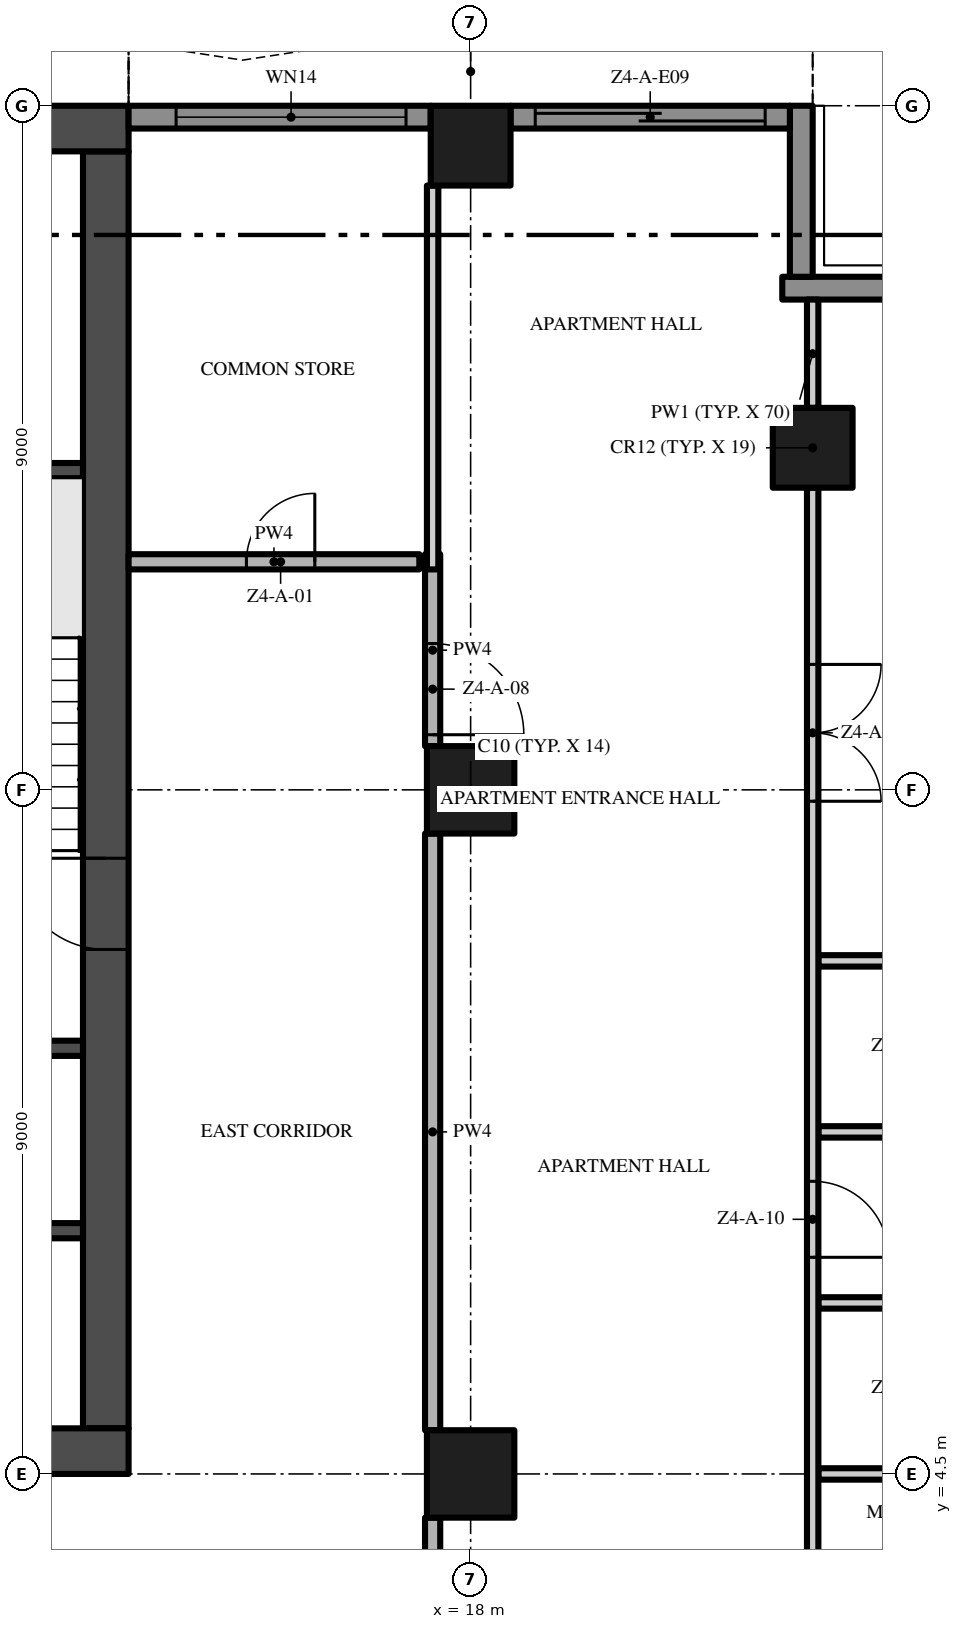
"""IFC4 building model, lengths in metres.
Left out: names, types, materials, properties, quantities, classifications, styles, units other than length and angle.
Written with IfcOpenShell. Run it as: python <this file> out.ifc"""

import sys

from ifc_helpers import new_model, si_unit, direction, frame, frame_2d, origin, origin_2d, place, context, subcontext, project, spatial, polyline, rectangle, outline, extrude, element, fill, save


model = new_model("IFC4")
c1 = context("Model", 3, precision=1e-05, world=origin(), true_north=direction((0.0, 1.0)))
c2 = subcontext(c1, "Body", "Model", "MODEL_VIEW")
j1 = project(units=[si_unit("LENGTHUNIT", "METRE"), si_unit("PLANEANGLEUNIT", "RADIAN")], contexts=[c1])
p1 = place(None, origin())
s1 = spatial("IfcSite", under=j1, at=p1, CompositionType="ELEMENT")
p2 = place(p1, origin())
s2 = spatial("IfcBuilding", under=s1, at=p2, CompositionType="ELEMENT")
p3 = place(p2, frame((0.0, 0.0, 188.2)))
s3 = spatial("IfcBuildingStorey", under=s2, at=p3, CompositionType="ELEMENT", Elevation=188.2)
p4 = place(p3, frame((-13.5, 4.8, -0.3), z_axis=(0.0, 0.0, 1.0), x_axis=(1.0, 0.0, 0.0)))
e1 = element("IfcWall", 1, at=p4, inside=s3, PredefinedType="SHEAR", context=c2, shape_type="SweptSolid", body=[
    extrude(rectangle(XDim=27.0, YDim=0.6, at=frame_2d((13.5, 0.0))), origin(), (0.0, 0.0, 1.0), 3.8),
])
p5 = place(p4, frame((12.0, 0.0, 0.3)))
e2 = element("IfcOpeningElement", 2, at=p5, cuts=e1, PredefinedType="OPENING", context=c2, shape_type="SweptSolid", body=[
    extrude(rectangle(XDim=3.0, YDim=2.4, at=frame_2d((1.5, 1.2))), frame((0.0, 0.31, 0.0), z_axis=(0.0, -1.0, 0.0), x_axis=(1.0, 0.0, 0.0)), (0.0, 0.0, 1.0), 0.62),
])
p6 = place(p4, frame((4.9, 0.0, 0.3)))
e3 = element("IfcOpeningElement", 3, at=p6, cuts=e1, PredefinedType="OPENING", context=c2, shape_type="SweptSolid", body=[
    extrude(rectangle(XDim=1.2, YDim=2.2, at=frame_2d((0.6, 1.1))), frame((0.0, 0.31, 0.0), z_axis=(0.0, -1.0, 0.0), x_axis=(1.0, 0.0, 0.0)), (0.0, 0.0, 1.0), 0.62),
])
p7 = place(p4, frame((20.75, 0.0, 0.3)))
e4 = element("IfcOpeningElement", 4, at=p7, cuts=e1, PredefinedType="OPENING", context=c2, shape_type="SweptSolid", body=[
    extrude(rectangle(XDim=1.5, YDim=2.2, at=frame_2d((0.75, 1.1))), frame((0.0, 0.31, 0.0), z_axis=(0.0, -1.0, 0.0), x_axis=(1.0, 0.0, 0.0)), (0.0, 0.0, 1.0), 0.62),
])
p8 = place(p4, frame((17.4, 0.0, 0.3)))
e5 = element("IfcOpeningElement", 5, at=p8, cuts=e1, PredefinedType="OPENING", context=c2, shape_type="SweptSolid", body=[
    extrude(rectangle(XDim=1.2, YDim=2.2, at=frame_2d((0.6, 1.1))), frame((0.0, 0.31, 0.0), z_axis=(0.0, -1.0, 0.0), x_axis=(1.0, 0.0, 0.0)), (0.0, 0.0, 1.0), 0.62),
])
p9 = place(p3, frame((13.2, 5.1, -0.3), z_axis=(0.0, 0.0, 1.0), x_axis=(0.0, 1.0, 0.0)))
e6 = element("IfcWall", 6, at=p9, inside=s3, PredefinedType="SHEAR", context=c2, shape_type="SweptSolid", body=[
    extrude(rectangle(XDim=16.8, YDim=0.6, at=frame_2d((8.4, 0.0))), origin(), (0.0, 0.0, 1.0), 3.8),
])
p10 = place(p9, frame((6.3, 0.0, 0.3)))
e7 = element("IfcOpeningElement", 7, at=p10, cuts=e6, PredefinedType="OPENING", context=c2, shape_type="SweptSolid", body=[
    extrude(rectangle(XDim=1.2, YDim=2.2, at=frame_2d((0.6, 1.1))), frame((0.0, 0.31, 0.0), z_axis=(0.0, -1.0, 0.0), x_axis=(1.0, 0.0, 0.0)), (0.0, 0.0, 1.0), 0.62),
])
p11 = place(p3, frame((13.5, 22.2, -0.3), z_axis=(0.0, 0.0, 1.0), x_axis=(-1.0, 0.0, 0.0)))
e8 = element("IfcWall", 8, at=p11, inside=s3, PredefinedType="SHEAR", context=c2, shape_type="SweptSolid", body=[
    extrude(rectangle(XDim=27.0, YDim=0.6, at=frame_2d((13.5, 0.0))), origin(), (0.0, 0.0, 1.0), 3.8),
])
p12 = place(p3, frame((18.0, 13.5, 0.0), z_axis=(0.0, 0.0, 1.0), x_axis=(1.0, 0.0, 0.0)))
e9 = element("IfcColumn", 9, at=p12, inside=s3, PredefinedType="COLUMN", context=c2, shape_type="SweptSolid", body=[
    extrude(rectangle(XDim=1.15, YDim=1.15, at=origin_2d()), origin(), (0.0, 0.0, 1.0), 3.5),
])
p13 = place(p3, frame((18.0, 21.975, 0.0), z_axis=(0.0, 0.0, 1.0), x_axis=(1.0, 0.0, 0.0)))
e10 = element("IfcColumn", 10, at=p13, inside=s3, PredefinedType="COLUMN", context=c2, shape_type="SweptSolid", body=[
    extrude(rectangle(XDim=1.05, YDim=1.05, at=origin_2d()), origin(), (0.0, 0.0, 1.0), 3.5),
])
p14 = place(p3, frame((18.0, 4.5, 0.0), z_axis=(0.0, 0.0, 1.0), x_axis=(1.0, 0.0, 0.0)))
e11 = element("IfcColumn", 11, at=p14, inside=s3, PredefinedType="COLUMN", context=c2, shape_type="SweptSolid", body=[
    extrude(rectangle(XDim=1.15, YDim=1.15, at=origin_2d()), origin(), (0.0, 0.0, 1.0), 3.5),
])
p15 = place(p3, frame((22.5, 18.0, 0.0), z_axis=(0.0, 0.0, 1.0), x_axis=(1.0, 0.0, 0.0)))
e12 = element("IfcColumn", 12, at=p15, inside=s3, PredefinedType="COLUMN", context=c2, shape_type="SweptSolid", body=[
    extrude(rectangle(XDim=1.05, YDim=1.05, at=origin_2d()), origin(), (0.0, 0.0, 1.0), 3.5),
])
p16 = place(p3, frame((22.1, 20.1, 0.0), z_axis=(0.0, 0.0, 1.0), x_axis=(1.0, 0.0, 0.0)))
e13 = element("IfcWall", 13, at=p16, inside=s3, PredefinedType="SOLIDWALL", context=c2, shape_type="SweptSolid", body=[
    extrude(rectangle(XDim=2.35, YDim=0.3, at=frame_2d((1.175, 0.0))), origin(), (0.0, 0.0, 1.0), 3.5),
])
p17 = place(p3, frame((22.35, 22.5, 0.0), z_axis=(0.0, 0.0, 1.0), x_axis=(0.0, -1.0, 0.0)))
e14 = element("IfcWall", 14, at=p17, inside=s3, PredefinedType="SOLIDWALL", context=c2, shape_type="SweptSolid", body=[
    extrude(rectangle(XDim=2.25, YDim=0.3, at=frame_2d((1.125, 0.0))), origin(), (0.0, 0.0, 1.0), 3.5),
])
p18 = place(p3, frame((18.525, 22.35, 0.0), z_axis=(0.0, 0.0, 1.0), x_axis=(1.0, 0.0, 0.0)))
e15 = element("IfcWall", 15, at=p18, inside=s3, PredefinedType="SOLIDWALL", context=c2, shape_type="SweptSolid", body=[
    extrude(rectangle(XDim=3.675, YDim=0.3, at=frame_2d((1.837, 0.0))), origin(), (0.0, 0.0, 1.0), 3.5),
])
p19 = place(p18, frame((0.325, 0.0, 0.0)))
e16 = element("IfcOpeningElement", 16, at=p19, cuts=e15, PredefinedType="OPENING", context=c2, shape_type="SweptSolid", body=[
    extrude(rectangle(XDim=3.025, YDim=2.4, at=frame_2d((1.512, 1.2))), frame((0.0, 0.16, 0.0), z_axis=(0.0, -1.0, 0.0), x_axis=(1.0, 0.0, 0.0)), (0.0, 0.0, 1.0), 0.32),
])
p20 = place(p3, frame((13.5, 22.35, 0.0), z_axis=(0.0, 0.0, 1.0), x_axis=(1.0, 0.0, 0.0)))
e17 = element("IfcWall", 17, at=p20, inside=s3, PredefinedType="SOLIDWALL", context=c2, shape_type="SweptSolid", body=[
    extrude(rectangle(XDim=3.975, YDim=0.3, at=frame_2d((1.988, 0.0))), origin(), (0.0, 0.0, 1.0), 3.5),
])
p21 = place(p20, frame((0.625, 0.0, 0.45)))
e18 = element("IfcOpeningElement", 18, at=p21, cuts=e17, PredefinedType="OPENING", context=c2, shape_type="SweptSolid", body=[
    extrude(rectangle(XDim=3.025, YDim=2.65, at=frame_2d((1.512, 1.325))), frame((0.0, 0.16, 0.0), z_axis=(0.0, -1.0, 0.0), x_axis=(1.0, 0.0, 0.0)), (0.0, 0.0, 1.0), 0.32),
])
p22 = place(p3, origin())
e19 = element("IfcWall", 19, at=p22, inside=s3, PredefinedType="USERDEFINED", context=c2, shape_type="SweptSolid", body=[
    extrude(outline(polyline([(22.5, 25.5), (21.0, 25.271), (19.5, 24.671), (18.0, 23.929), (16.5, 23.329), (15.0, 23.1), (13.5, 23.329), (13.462, 23.082), (15.0, 22.847), (16.566, 23.086), (18.102, 23.701), (19.602, 24.442), (21.066, 25.028), (22.538, 25.253), (22.5, 25.5)])), origin(), (0.0, 0.0, 1.0), 0.9),
])
for number, where, z_axis, x_axis in (
    (20, (9.65, 7.7, 0.0), (0.0, 0.0, 1.0), (1.0, 0.0, 0.0)),
    (21, (9.65, 10.1, 0.0), (0.0, 0.0, 1.0), (1.0, 0.0, 0.0)),
    (22, (9.65, 17.7, 0.0), (0.0, 0.0, 1.0), (1.0, 0.0, 0.0)),
):
    element("IfcWall", number, at=place(p3, frame(where, z_axis=z_axis, x_axis=x_axis)), inside=s3, PredefinedType="SHEAR", context=c2, shape_type="SweptSolid", body=[
        extrude(rectangle(XDim=3.25, YDim=0.2, at=frame_2d((1.625, 0.0))), origin(), (0.0, 0.0, 1.0), 3.5),
    ])
p23 = place(p3, frame((22.575, 4.5, 0.0), z_axis=(0.0, 0.0, 1.0), x_axis=(1.0, 0.0, 0.0)))
e23 = element("IfcWall", 23, at=p23, inside=s3, PredefinedType="PARTITIONING", context=c2, shape_type="SweptSolid", body=[
    extrude(rectangle(XDim=3.375, YDim=0.15, at=frame_2d((1.688, 0.0))), origin(), (0.0, 0.0, 1.0), 3.5),
])
p24 = place(p3, frame((22.575, 6.75, 0.0), z_axis=(0.0, 0.0, 1.0), x_axis=(1.0, 0.0, 0.0)))
e24 = element("IfcWall", 24, at=p24, inside=s3, PredefinedType="PARTITIONING", context=c2, shape_type="SweptSolid", body=[
    extrude(rectangle(XDim=1.875, YDim=0.15, at=frame_2d((0.938, 0.0))), origin(), (0.0, 0.0, 1.0), 3.5),
])
p25 = place(p3, frame((22.575, 9.0, 0.0), z_axis=(0.0, 0.0, 1.0), x_axis=(1.0, 0.0, 0.0)))
e25 = element("IfcWall", 25, at=p25, inside=s3, PredefinedType="PARTITIONING", context=c2, shape_type="SweptSolid", body=[
    extrude(rectangle(XDim=4.125, YDim=0.15, at=frame_2d((2.062, 0.0))), origin(), (0.0, 0.0, 1.0), 3.5),
])
p26 = place(p3, frame((22.575, 11.25, 0.0), z_axis=(0.0, 0.0, 1.0), x_axis=(1.0, 0.0, 0.0)))
e26 = element("IfcWall", 26, at=p26, inside=s3, PredefinedType="PARTITIONING", context=c2, shape_type="SweptSolid", body=[
    extrude(rectangle(XDim=1.875, YDim=0.15, at=frame_2d((0.938, 0.0))), origin(), (0.0, 0.0, 1.0), 3.5),
])
p27 = place(p3, frame((13.5, 16.5, 0.0), z_axis=(0.0, 0.0, 1.0), x_axis=(1.0, 0.0, 0.0)))
e27 = element("IfcWall", 27, at=p27, inside=s3, PredefinedType="PARTITIONING", context=c2, shape_type="SweptSolid", body=[
    extrude(rectangle(XDim=3.825, YDim=0.2, at=frame_2d((1.913, 0.0))), origin(), (0.0, 0.0, 1.0), 3.5),
])
p28 = place(p27, frame((1.55, 0.0, 0.0)))
e28 = element("IfcOpeningElement", 28, at=p28, cuts=e27, PredefinedType="OPENING", context=c2, shape_type="SweptSolid", body=[
    extrude(rectangle(XDim=0.9, YDim=2.1, at=frame_2d((0.45, 1.05))), frame((0.0, 0.11, 0.0), z_axis=(0.0, -1.0, 0.0), x_axis=(1.0, 0.0, 0.0)), (0.0, 0.0, 1.0), 0.22),
])
p29 = place(p3, frame((17.5, -0.2, 0.0), z_axis=(0.0, 0.0, 1.0), x_axis=(0.0, 1.0, 0.0)))
e29 = element("IfcWall", 29, at=p29, inside=s3, PredefinedType="PARTITIONING", context=c2, shape_type="SweptSolid", body=[
    extrude(rectangle(XDim=4.125, YDim=0.2, at=frame_2d((2.062, 0.0))), origin(), (0.0, 0.0, 1.0), 3.5),
])
p30 = place(p3, frame((17.5, 5.075, 0.0), z_axis=(0.0, 0.0, 1.0), x_axis=(0.0, 1.0, 0.0)))
e30 = element("IfcWall", 30, at=p30, inside=s3, PredefinedType="PARTITIONING", context=c2, shape_type="SweptSolid", body=[
    extrude(rectangle(XDim=7.85, YDim=0.2, at=frame_2d((3.925, 0.0))), origin(), (0.0, 0.0, 1.0), 3.5),
])
p31 = place(p3, frame((17.5, 16.6, 0.0), z_axis=(0.0, 0.0, 1.0), x_axis=(0.0, -1.0, 0.0)))
e31 = element("IfcWall", 31, at=p31, inside=s3, PredefinedType="PARTITIONING", context=c2, shape_type="SweptSolid", body=[
    extrude(rectangle(XDim=2.525, YDim=0.2, at=frame_2d((1.262, 0.0))), origin(), (0.0, 0.0, 1.0), 3.5),
])
p32 = place(p31, frame((1.175, 0.0, 0.0)))
e32 = element("IfcOpeningElement", 32, at=p32, cuts=e31, PredefinedType="OPENING", context=c2, shape_type="SweptSolid", body=[
    extrude(rectangle(XDim=1.2, YDim=2.4, at=frame_2d((0.6, 1.2))), frame((0.0, 0.11, 0.0), z_axis=(0.0, -1.0, 0.0), x_axis=(1.0, 0.0, 0.0)), (0.0, 0.0, 1.0), 0.22),
])
p33 = place(p3, frame((17.5, 16.4, 0.0), z_axis=(0.0, 0.0, 1.0), x_axis=(0.0, 1.0, 0.0)))
e33 = element("IfcWall", 33, at=p33, inside=s3, PredefinedType="PARTITIONING", context=c2, shape_type="SweptSolid", body=[
    extrude(rectangle(XDim=5.05, YDim=0.15, at=frame_2d((2.525, 0.0))), origin(), (0.0, 0.0, 1.0), 3.5),
])
p34 = place(p3, frame((22.5, 17.475, 0.0), z_axis=(0.0, 0.0, 1.0), x_axis=(0.0, -1.0, 0.0)))
e34 = element("IfcWall", 34, at=p34, inside=s3, PredefinedType="PARTITIONING", context=c2, shape_type="SweptSolid", body=[
    extrude(rectangle(XDim=17.375, YDim=0.15, at=frame_2d((8.688, 0.0))), origin(), (0.0, 0.0, 1.0), 3.5),
])
p35 = place(p34, frame((14.725, 0.0, 0.0)))
e35 = element("IfcOpeningElement", 35, at=p35, cuts=e34, PredefinedType="OPENING", context=c2, shape_type="SweptSolid", body=[
    extrude(rectangle(XDim=1.0, YDim=2.4, at=frame_2d((0.5, 1.2))), frame((0.0, 0.085, 0.0), z_axis=(0.0, -1.0, 0.0), x_axis=(1.0, 0.0, 0.0)), (0.0, 0.0, 1.0), 0.17),
])
p36 = place(p34, frame((9.125, 0.0, 0.0)))
e36 = element("IfcOpeningElement", 36, at=p36, cuts=e34, PredefinedType="OPENING", context=c2, shape_type="SweptSolid", body=[
    extrude(rectangle(XDim=1.0, YDim=2.4, at=frame_2d((0.5, 1.2))), frame((0.0, 0.085, 0.0), z_axis=(0.0, -1.0, 0.0), x_axis=(1.0, 0.0, 0.0)), (0.0, 0.0, 1.0), 0.17),
])
p37 = place(p34, frame((2.325, 0.0, 0.0)))
e37 = element("IfcOpeningElement", 37, at=p37, cuts=e34, PredefinedType="OPENING", context=c2, shape_type="SweptSolid", body=[
    extrude(rectangle(XDim=1.8, YDim=2.4, at=frame_2d((0.9, 1.2))), frame((0.0, 0.085, 0.0), z_axis=(0.0, -1.0, 0.0), x_axis=(1.0, 0.0, 0.0)), (0.0, 0.0, 1.0), 0.17),
])
p38 = place(p3, frame((22.5, 18.525, 0.0), z_axis=(0.0, 0.0, 1.0), x_axis=(0.0, 1.0, 0.0)))
e38 = element("IfcWall", 38, at=p38, inside=s3, PredefinedType="PARTITIONING", context=c2, shape_type="SweptSolid", body=[
    extrude(rectangle(XDim=1.425, YDim=0.15, at=frame_2d((0.713, 0.0))), origin(), (0.0, 0.0, 1.0), 3.5),
])
p39 = place(p19, origin())
e39 = element("IfcDoor", 39, at=p39, inside=s3, OperationType="SINGLE_SWING_LEFT", PredefinedType="DOOR", context=c2, shape_type="SweptSolid", body=[
    extrude(rectangle(XDim=3.025, YDim=2.4, at=frame_2d((1.512, 1.2))), frame((0.0, 0.025, 0.0), z_axis=(0.0, -1.0, 0.0), x_axis=(1.0, 0.0, 0.0)), (0.0, 0.0, 1.0), 0.05),
])
fill(e16, e39)
p40 = place(p21, origin())
e40 = element("IfcWindow", 40, at=p40, inside=s3, PartitioningType="SINGLE_PANEL", PredefinedType="WINDOW", context=c2, shape_type="SweptSolid", body=[
    extrude(rectangle(XDim=3.025, YDim=2.65, at=frame_2d((1.512, 1.325))), frame((0.0, 0.03, 0.0), z_axis=(0.0, -1.0, 0.0), x_axis=(1.0, 0.0, 0.0)), (0.0, 0.0, 1.0), 0.06),
])
fill(e18, e40)
p41 = place(p10, frame((1.2, 0.0, 0.0), z_axis=(0.0, 0.0, 1.0), x_axis=(-1.0, 0.0, 0.0)))
e41 = element("IfcDoor", 41, at=p41, inside=s3, OperationType="SINGLE_SWING_LEFT", PredefinedType="DOOR", context=c2, shape_type="SweptSolid", body=[
    extrude(rectangle(XDim=1.2, YDim=2.2, at=frame_2d((0.6, 1.1))), frame((0.0, 0.025, 0.0), z_axis=(0.0, -1.0, 0.0), x_axis=(1.0, 0.0, 0.0)), (0.0, 0.0, 1.0), 0.05),
])
fill(e7, e41)
p42 = place(p28, origin())
e42 = element("IfcDoor", 42, at=p42, inside=s3, OperationType="SINGLE_SWING_RIGHT", PredefinedType="DOOR", context=c2, shape_type="SweptSolid", body=[
    extrude(rectangle(XDim=0.9, YDim=2.1, at=frame_2d((0.45, 1.05))), frame((0.0, 0.025, 0.0), z_axis=(0.0, -1.0, 0.0), x_axis=(1.0, 0.0, 0.0)), (0.0, 0.0, 1.0), 0.05),
])
fill(e28, e42)
p43 = place(p32, origin())
e43 = element("IfcDoor", 43, at=p43, inside=s3, OperationType="SINGLE_SWING_RIGHT", PredefinedType="DOOR", context=c2, shape_type="SweptSolid", body=[
    extrude(rectangle(XDim=1.2, YDim=2.4, at=frame_2d((0.6, 1.2))), frame((0.0, 0.025, 0.0), z_axis=(0.0, -1.0, 0.0), x_axis=(1.0, 0.0, 0.0)), (0.0, 0.0, 1.0), 0.05),
])
fill(e32, e43)
p44 = place(p36, origin())
e44 = element("IfcDoor", 44, at=p44, inside=s3, OperationType="SINGLE_SWING_RIGHT", PredefinedType="DOOR", context=c2, shape_type="SweptSolid", body=[
    extrude(rectangle(XDim=1.0, YDim=2.4, at=frame_2d((0.5, 1.2))), frame((0.0, 0.025, 0.0), z_axis=(0.0, -1.0, 0.0), x_axis=(1.0, 0.0, 0.0)), (0.0, 0.0, 1.0), 0.05),
])
fill(e36, e44)
p45 = place(p37, origin())
e45 = element("IfcDoor", 45, at=p45, inside=s3, OperationType="DOUBLE_DOOR_SINGLE_SWING", PredefinedType="DOOR", context=c2, shape_type="SweptSolid", body=[
    extrude(rectangle(XDim=1.8, YDim=2.4, at=frame_2d((0.9, 1.2))), frame((0.0, 0.025, 0.0), z_axis=(0.0, -1.0, 0.0), x_axis=(1.0, 0.0, 0.0)), (0.0, 0.0, 1.0), 0.05),
])
fill(e37, e45)
save(model, sys.argv[1])
